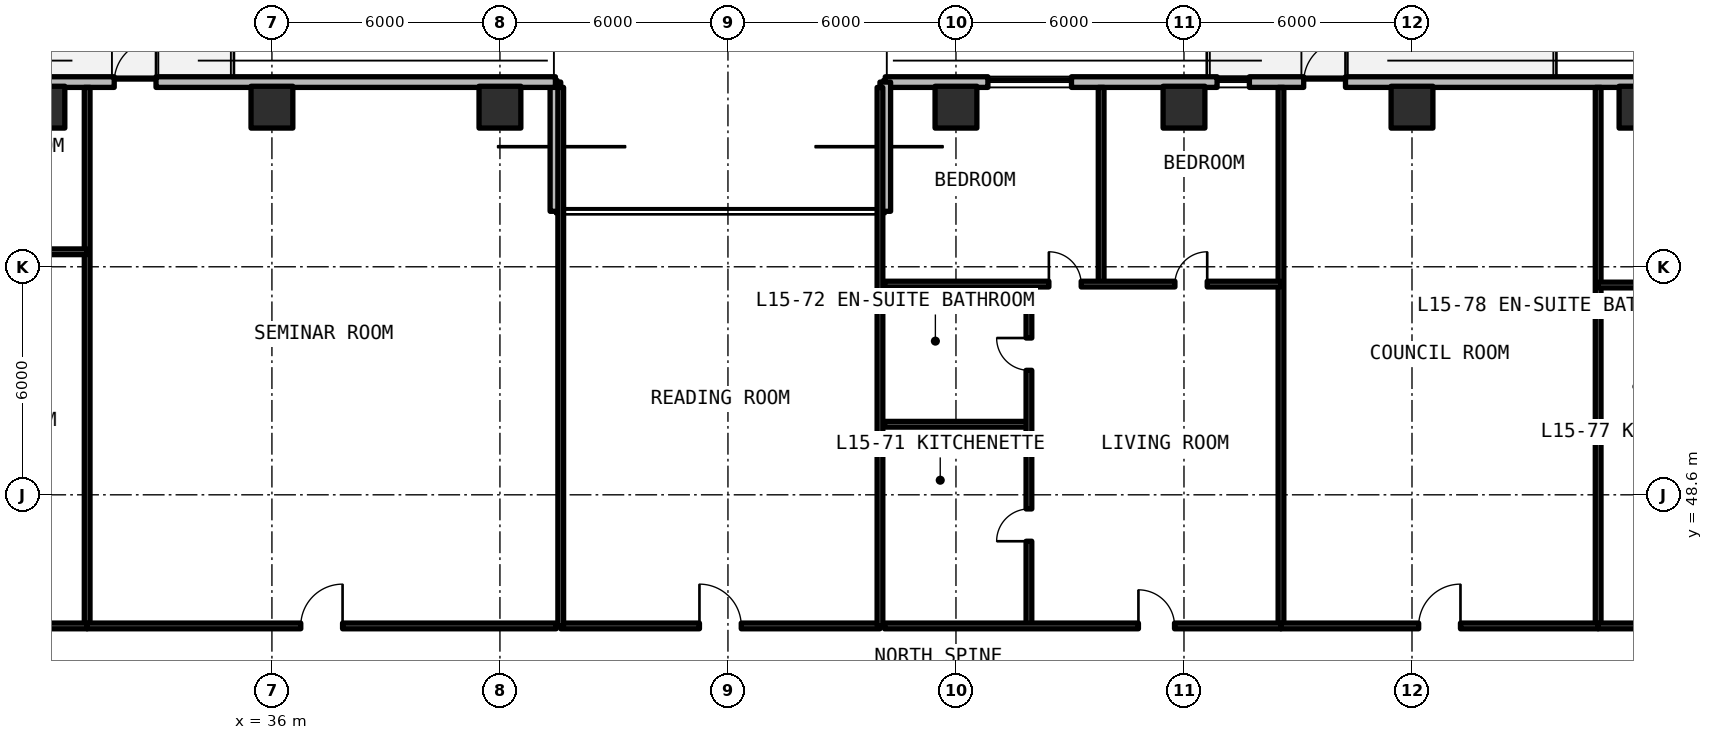
"""IFC4 building model, lengths in metres.
Left out: names, types, materials, properties, quantities, classifications, styles, units other than length and angle.
Written with IfcOpenShell. Run it as: python <this file> out.ifc"""

import sys

from ifc_helpers import new_model, si_unit, direction, frame, frame_2d, origin, origin_2d, place, context, subcontext, project, spatial, rectangle, extrude, element, fill, save


model = new_model("IFC4")
c1 = context("Model", 3, precision=1e-05, world=origin(), true_north=direction((0.0, 1.0)))
c2 = subcontext(c1, "Body", "Model", "MODEL_VIEW")
j1 = project(units=[si_unit("LENGTHUNIT", "METRE"), si_unit("PLANEANGLEUNIT", "RADIAN")], contexts=[c1])
p1 = place(None, origin())
s1 = spatial("IfcSite", under=j1, at=p1, CompositionType="ELEMENT")
p2 = place(p1, origin())
s2 = spatial("IfcBuilding", under=s1, at=p2, CompositionType="ELEMENT")
p3 = place(p2, frame((0.0, 0.0, 55.44)))
s3 = spatial("IfcBuildingStorey", under=s2, at=p3, CompositionType="ELEMENT", Elevation=55.44)
for number, where, z_axis, x_axis in (
    (1, (30.0, 58.8, 0.0), (0.0, 0.0, 1.0), (1.0, 0.0, 0.0)),
    (2, (36.0, 58.8, 0.0), (0.0, 0.0, 1.0), (1.0, 0.0, 0.0)),
    (3, (42.0, 58.8, 0.0), (0.0, 0.0, 1.0), (1.0, 0.0, 0.0)),
    (4, (54.0, 58.8, 0.0), (0.0, 0.0, 1.0), (1.0, 0.0, 0.0)),
    (5, (60.0, 58.8, 0.0), (0.0, 0.0, 1.0), (1.0, 0.0, 0.0)),
    (6, (66.0, 58.8, 0.0), (0.0, 0.0, 1.0), (1.0, 0.0, 0.0)),
    (7, (72.0, 58.8, 0.0), (0.0, 0.0, 1.0), (1.0, 0.0, 0.0)),
):
    element("IfcColumn", number, at=place(p3, frame(where, z_axis=z_axis, x_axis=x_axis)), inside=s3, PredefinedType="COLUMN", context=c2, shape_type="SweptSolid", body=[
        extrude(rectangle(XDim=1.1, YDim=1.1, at=origin_2d()), origin(), (0.0, 0.0, 1.0), 3.3),
    ])
p4 = place(p3, frame((96.542, 59.46, 0.0), z_axis=(0.0, 0.0, 1.0), x_axis=(-1.0, 0.0, 0.0)))
e8 = element("IfcWall", 8, at=p4, inside=s3, PredefinedType="SOLIDWALL", context=c2, shape_type="SweptSolid", body=[
    extrude(rectangle(XDim=44.402, YDim=0.28, at=frame_2d((22.201, 0.0))), origin(), (0.0, 0.0, 1.0), 3.08),
])
p5 = place(p4, frame((32.292, 0.0, 0.0)))
e9 = element("IfcOpeningElement", 9, at=p5, cuts=e8, PredefinedType="OPENING", context=c2, shape_type="SweptSolid", body=[
    extrude(rectangle(XDim=1.1, YDim=2.15, at=frame_2d((0.55, 1.075))), frame((0.0, 0.15, 0.0), z_axis=(0.0, -1.0, 0.0), x_axis=(1.0, 0.0, 0.0)), (0.0, 0.0, 1.0), 0.3),
])
p6 = place(p4, frame((20.692, 0.0, 0.0)))
e10 = element("IfcOpeningElement", 10, at=p6, cuts=e8, PredefinedType="OPENING", context=c2, shape_type="SweptSolid", body=[
    extrude(rectangle(XDim=1.1, YDim=2.15, at=frame_2d((0.55, 1.075))), frame((0.0, 0.15, 0.0), z_axis=(0.0, -1.0, 0.0), x_axis=(1.0, 0.0, 0.0)), (0.0, 0.0, 1.0), 0.3),
])
p7 = place(p4, frame((8.342, 0.0, 0.0)))
e11 = element("IfcOpeningElement", 11, at=p7, cuts=e8, PredefinedType="OPENING", context=c2, shape_type="SweptSolid", body=[
    extrude(rectangle(XDim=1.1, YDim=2.15, at=frame_2d((0.55, 1.075))), frame((0.0, 0.15, 0.0), z_axis=(0.0, -1.0, 0.0), x_axis=(1.0, 0.0, 0.0)), (0.0, 0.0, 1.0), 0.3),
])
p8 = place(p4, frame((39.502, 0.0, 0.78)))
e12 = element("IfcOpeningElement", 12, at=p8, cuts=e8, PredefinedType="OPENING", context=c2, shape_type="SweptSolid", body=[
    extrude(rectangle(XDim=2.2, YDim=1.66, at=frame_2d((1.1, 0.83))), frame((0.0, 0.15, 0.0), z_axis=(0.0, -1.0, 0.0), x_axis=(1.0, 0.0, 0.0)), (0.0, 0.0, 1.0), 0.3),
])
p9 = place(p4, frame((34.821, 0.0, 0.78)))
e13 = element("IfcOpeningElement", 13, at=p9, cuts=e8, PredefinedType="OPENING", context=c2, shape_type="SweptSolid", body=[
    extrude(rectangle(XDim=0.85, YDim=1.65, at=frame_2d((0.425, 0.825))), frame((0.0, 0.15, 0.0), z_axis=(0.0, -1.0, 0.0), x_axis=(1.0, 0.0, 0.0)), (0.0, 0.0, 1.0), 0.3),
])
p10 = place(p4, frame((15.472, 0.0, 0.78)))
e14 = element("IfcOpeningElement", 14, at=p10, cuts=e8, PredefinedType="OPENING", context=c2, shape_type="SweptSolid", body=[
    extrude(rectangle(XDim=2.2, YDim=1.66, at=frame_2d((1.1, 0.83))), frame((0.0, 0.15, 0.0), z_axis=(0.0, -1.0, 0.0), x_axis=(1.0, 0.0, 0.0)), (0.0, 0.0, 1.0), 0.3),
])
p11 = place(p4, frame((2.288, 0.0, 0.78)))
e15 = element("IfcOpeningElement", 15, at=p11, cuts=e8, PredefinedType="OPENING", context=c2, shape_type="SweptSolid", body=[
    extrude(rectangle(XDim=2.2, YDim=1.66, at=frame_2d((1.1, 0.83))), frame((0.0, 0.15, 0.0), z_axis=(0.0, -1.0, 0.0), x_axis=(1.0, 0.0, 0.0)), (0.0, 0.0, 1.0), 0.3),
])
for number, where, z_axis, x_axis in (
    (16, (52.14, 59.46, 0.0), (0.0, 0.0, 1.0), (0.0, -1.0, 0.0)),
    (17, (43.46, 56.06, 0.0), (0.0, 0.0, 1.0), (0.0, 1.0, 0.0)),
):
    element("IfcWall", number, at=place(p3, frame(where, z_axis=z_axis, x_axis=x_axis)), inside=s3, PredefinedType="SOLIDWALL", context=c2, shape_type="SweptSolid", body=[
        extrude(rectangle(XDim=3.4, YDim=0.28, at=frame_2d((1.7, 0.0))), origin(), (0.0, 0.0, 1.0), 3.08),
    ])
p12 = place(p3, frame((43.46, 59.46, 0.0), z_axis=(0.0, 0.0, 1.0), x_axis=(-1.0, 0.0, 0.0)))
e18 = element("IfcWall", 18, at=p12, inside=s3, PredefinedType="SOLIDWALL", context=c2, shape_type="SweptSolid", body=[
    extrude(rectangle(XDim=22.602, YDim=0.28, at=frame_2d((11.301, 0.0))), origin(), (0.0, 0.0, 1.0), 3.08),
])
p13 = place(p12, frame((10.51, 0.0, 0.0)))
e19 = element("IfcOpeningElement", 19, at=p13, cuts=e18, PredefinedType="OPENING", context=c2, shape_type="SweptSolid", body=[
    extrude(rectangle(XDim=1.1, YDim=2.15, at=frame_2d((0.55, 1.075))), frame((0.0, 0.15, 0.0), z_axis=(0.0, -1.0, 0.0), x_axis=(1.0, 0.0, 0.0)), (0.0, 0.0, 1.0), 0.3),
])
p14 = place(p12, frame((16.34, 0.0, 0.78)))
e20 = element("IfcOpeningElement", 20, at=p14, cuts=e18, PredefinedType="OPENING", context=c2, shape_type="SweptSolid", body=[
    extrude(rectangle(XDim=2.2, YDim=1.66, at=frame_2d((1.1, 0.83))), frame((0.0, 0.15, 0.0), z_axis=(0.0, -1.0, 0.0), x_axis=(1.0, 0.0, 0.0)), (0.0, 0.0, 1.0), 0.3),
])
p15 = place(p12, frame((14.206, 0.0, 0.78)))
e21 = element("IfcOpeningElement", 21, at=p15, cuts=e18, PredefinedType="OPENING", context=c2, shape_type="SweptSolid", body=[
    extrude(rectangle(XDim=0.85, YDim=1.65, at=frame_2d((0.425, 0.825))), frame((0.0, 0.15, 0.0), z_axis=(0.0, -1.0, 0.0), x_axis=(1.0, 0.0, 0.0)), (0.0, 0.0, 1.0), 0.3),
])
p16 = place(p3, frame((43.6, 45.15, 0.0), z_axis=(0.0, 0.0, 1.0), x_axis=(1.0, 0.0, 0.0)))
e22 = element("IfcWall", 22, at=p16, inside=s3, PredefinedType="SOLIDWALL", context=c2, shape_type="SweptSolid", body=[
    extrude(rectangle(XDim=8.4, YDim=0.15, at=frame_2d((4.2, 0.0))), origin(), (0.0, 0.0, 1.0), 2.35),
])
p17 = place(p16, frame((3.65, 0.0, 0.0)))
e23 = element("IfcOpeningElement", 23, at=p17, cuts=e22, PredefinedType="OPENING", context=c2, shape_type="SweptSolid", body=[
    extrude(rectangle(XDim=1.1, YDim=2.15, at=frame_2d((0.55, 1.075))), frame((0.0, 0.085, 0.0), z_axis=(0.0, -1.0, 0.0), x_axis=(1.0, 0.0, 0.0)), (0.0, 0.0, 1.0), 0.17),
])
for number, where, z_axis, x_axis in (
    (24, (43.6, 45.15, 0.0), (0.0, 0.0, 1.0), (0.0, 1.0, 0.0)),
    (25, (52.0, 45.15, 0.0), (0.0, 0.0, 1.0), (0.0, 1.0, 0.0)),
    (26, (31.138, 45.15, 0.0), (0.0, 0.0, 1.0), (0.0, 1.0, 0.0)),
):
    element("IfcWall", number, at=place(p3, frame(where, z_axis=z_axis, x_axis=x_axis)), inside=s3, PredefinedType="SOLIDWALL", context=c2, shape_type="SweptSolid", body=[
        extrude(rectangle(XDim=14.17, YDim=0.15, at=frame_2d((7.085, 0.0))), origin(), (0.0, 0.0, 1.0), 2.35),
    ])
p18 = place(p3, frame((21.0, 54.994, 0.0), z_axis=(0.0, 0.0, 1.0), x_axis=(1.0, 0.0, 0.0)))
e27 = element("IfcWall", 27, at=p18, inside=s3, PredefinedType="PARTITIONING", context=c2, shape_type="SweptSolid", body=[
    extrude(rectangle(XDim=10.138, YDim=0.15, at=frame_2d((5.069, 0.0))), origin(), (0.0, 0.0, 1.0), 2.35),
])
p19 = place(p18, frame((5.445, 0.0, 0.0)))
e28 = element("IfcOpeningElement", 28, at=p19, cuts=e27, PredefinedType="OPENING", context=c2, shape_type="SweptSolid", body=[
    extrude(rectangle(XDim=0.85, YDim=2.1, at=frame_2d((0.425, 1.05))), frame((0.0, 0.085, 0.0), z_axis=(0.0, -1.0, 0.0), x_axis=(1.0, 0.0, 0.0)), (0.0, 0.0, 1.0), 0.17),
])
p20 = place(p18, frame((8.054, 0.0, 0.0)))
e29 = element("IfcOpeningElement", 29, at=p20, cuts=e27, PredefinedType="OPENING", context=c2, shape_type="SweptSolid", body=[
    extrude(rectangle(XDim=0.85, YDim=2.1, at=frame_2d((0.425, 1.05))), frame((0.0, 0.085, 0.0), z_axis=(0.0, -1.0, 0.0), x_axis=(1.0, 0.0, 0.0)), (0.0, 0.0, 1.0), 0.17),
])
p21 = place(p3, frame((21.0, 45.15, 0.0), z_axis=(0.0, 0.0, 1.0), x_axis=(1.0, 0.0, 0.0)))
e30 = element("IfcWall", 30, at=p21, inside=s3, PredefinedType="SOLIDWALL", context=c2, shape_type="SweptSolid", body=[
    extrude(rectangle(XDim=10.138, YDim=0.15, at=frame_2d((5.069, 0.0))), origin(), (0.0, 0.0, 1.0), 2.35),
])
p22 = place(p21, frame((7.094, 0.0, 0.0)))
e31 = element("IfcOpeningElement", 31, at=p22, cuts=e30, PredefinedType="OPENING", context=c2, shape_type="SweptSolid", body=[
    extrude(rectangle(XDim=0.95, YDim=2.15, at=frame_2d((0.475, 1.075))), frame((0.0, 0.085, 0.0), z_axis=(0.0, -1.0, 0.0), x_axis=(1.0, 0.0, 0.0)), (0.0, 0.0, 1.0), 0.17),
])
p23 = place(p3, frame((31.138, 45.15, 0.0), z_axis=(0.0, 0.0, 1.0), x_axis=(1.0, 0.0, 0.0)))
e32 = element("IfcWall", 32, at=p23, inside=s3, PredefinedType="SOLIDWALL", context=c2, shape_type="SweptSolid", body=[
    extrude(rectangle(XDim=12.342, YDim=0.15, at=frame_2d((6.171, 0.0))), origin(), (0.0, 0.0, 1.0), 2.35),
])
p24 = place(p23, frame((5.621, 0.0, 0.0)))
e33 = element("IfcOpeningElement", 33, at=p24, cuts=e32, PredefinedType="OPENING", context=c2, shape_type="SweptSolid", body=[
    extrude(rectangle(XDim=1.1, YDim=2.15, at=frame_2d((0.55, 1.075))), frame((0.0, 0.085, 0.0), z_axis=(0.0, -1.0, 0.0), x_axis=(1.0, 0.0, 0.0)), (0.0, 0.0, 1.0), 0.17),
])
p25 = place(p3, frame((62.552, 45.15, 0.0), z_axis=(0.0, 0.0, 1.0), x_axis=(0.0, 1.0, 0.0)))
e34 = element("IfcWall", 34, at=p25, inside=s3, PredefinedType="SOLIDWALL", context=c2, shape_type="SweptSolid", body=[
    extrude(rectangle(XDim=14.17, YDim=0.15, at=frame_2d((7.085, 0.0))), origin(), (0.0, 0.0, 1.0), 2.35),
])
p26 = place(p3, frame((52.12, 50.457, 0.0), z_axis=(0.0, 0.0, 1.0), x_axis=(1.0, 0.0, 0.0)))
e35 = element("IfcWall", 35, at=p26, inside=s3, PredefinedType="PARTITIONING", context=c2, shape_type="SweptSolid", body=[
    extrude(rectangle(XDim=3.8, YDim=0.15, at=frame_2d((1.9, 0.0))), origin(), (0.0, 0.0, 1.0), 2.35),
])
p27 = place(p3, frame((55.92, 45.15, 0.0), z_axis=(0.0, 0.0, 1.0), x_axis=(0.0, 1.0, 0.0)))
e36 = element("IfcWall", 36, at=p27, inside=s3, PredefinedType="PARTITIONING", context=c2, shape_type="SweptSolid", body=[
    extrude(rectangle(XDim=8.995, YDim=0.15, at=frame_2d((4.497, 0.0))), origin(), (0.0, 0.0, 1.0), 2.35),
])
p28 = place(p27, frame((2.229, 0.0, 0.0)))
e37 = element("IfcOpeningElement", 37, at=p28, cuts=e36, PredefinedType="OPENING", context=c2, shape_type="SweptSolid", body=[
    extrude(rectangle(XDim=0.85, YDim=2.1, at=frame_2d((0.425, 1.05))), frame((0.0, 0.085, 0.0), z_axis=(0.0, -1.0, 0.0), x_axis=(1.0, 0.0, 0.0)), (0.0, 0.0, 1.0), 0.17),
])
p29 = place(p27, frame((6.726, 0.0, 0.0)))
e38 = element("IfcOpeningElement", 38, at=p29, cuts=e36, PredefinedType="OPENING", context=c2, shape_type="SweptSolid", body=[
    extrude(rectangle(XDim=0.85, YDim=2.1, at=frame_2d((0.425, 1.05))), frame((0.0, 0.085, 0.0), z_axis=(0.0, -1.0, 0.0), x_axis=(1.0, 0.0, 0.0)), (0.0, 0.0, 1.0), 0.17),
])
p30 = place(p3, frame((57.82, 54.145, 0.0), z_axis=(0.0, 0.0, 1.0), x_axis=(0.0, 1.0, 0.0)))
e39 = element("IfcWall", 39, at=p30, inside=s3, PredefinedType="PARTITIONING", context=c2, shape_type="SweptSolid", body=[
    extrude(rectangle(XDim=5.176, YDim=0.15, at=frame_2d((2.588, 0.0))), origin(), (0.0, 0.0, 1.0), 2.35),
])
p31 = place(p3, frame((52.12, 54.145, 0.0), z_axis=(0.0, 0.0, 1.0), x_axis=(1.0, 0.0, 0.0)))
e40 = element("IfcWall", 40, at=p31, inside=s3, PredefinedType="PARTITIONING", context=c2, shape_type="SweptSolid", body=[
    extrude(rectangle(XDim=10.432, YDim=0.15, at=frame_2d((5.216, 0.0))), origin(), (0.0, 0.0, 1.0), 2.35),
])
p32 = place(p31, frame((4.325, 0.0, 0.0)))
e41 = element("IfcOpeningElement", 41, at=p32, cuts=e40, PredefinedType="OPENING", context=c2, shape_type="SweptSolid", body=[
    extrude(rectangle(XDim=0.85, YDim=2.1, at=frame_2d((0.425, 1.05))), frame((0.0, 0.085, 0.0), z_axis=(0.0, -1.0, 0.0), x_axis=(1.0, 0.0, 0.0)), (0.0, 0.0, 1.0), 0.17),
])
p33 = place(p31, frame((7.641, 0.0, 0.0)))
e42 = element("IfcOpeningElement", 42, at=p33, cuts=e40, PredefinedType="OPENING", context=c2, shape_type="SweptSolid", body=[
    extrude(rectangle(XDim=0.85, YDim=2.1, at=frame_2d((0.425, 1.05))), frame((0.0, 0.085, 0.0), z_axis=(0.0, -1.0, 0.0), x_axis=(1.0, 0.0, 0.0)), (0.0, 0.0, 1.0), 0.17),
])
p34 = place(p3, frame((52.12, 45.15, 0.0), z_axis=(0.0, 0.0, 1.0), x_axis=(1.0, 0.0, 0.0)))
e43 = element("IfcWall", 43, at=p34, inside=s3, PredefinedType="SOLIDWALL", context=c2, shape_type="SweptSolid", body=[
    extrude(rectangle(XDim=10.432, YDim=0.15, at=frame_2d((5.216, 0.0))), origin(), (0.0, 0.0, 1.0), 2.35),
])
p35 = place(p34, frame((6.681, 0.0, 0.0)))
e44 = element("IfcOpeningElement", 44, at=p35, cuts=e43, PredefinedType="OPENING", context=c2, shape_type="SweptSolid", body=[
    extrude(rectangle(XDim=0.95, YDim=2.15, at=frame_2d((0.475, 1.075))), frame((0.0, 0.085, 0.0), z_axis=(0.0, -1.0, 0.0), x_axis=(1.0, 0.0, 0.0)), (0.0, 0.0, 1.0), 0.17),
])
p36 = place(p3, frame((70.898, 45.15, 0.0), z_axis=(0.0, 0.0, 1.0), x_axis=(0.0, 1.0, 0.0)))
e45 = element("IfcWall", 45, at=p36, inside=s3, PredefinedType="SOLIDWALL", context=c2, shape_type="SweptSolid", body=[
    extrude(rectangle(XDim=14.17, YDim=0.15, at=frame_2d((7.085, 0.0))), origin(), (0.0, 0.0, 1.0), 2.35),
])
p37 = place(p3, frame((62.552, 45.15, 0.0), z_axis=(0.0, 0.0, 1.0), x_axis=(1.0, 0.0, 0.0)))
e46 = element("IfcWall", 46, at=p37, inside=s3, PredefinedType="SOLIDWALL", context=c2, shape_type="SweptSolid", body=[
    extrude(rectangle(XDim=8.346, YDim=0.15, at=frame_2d((4.173, 0.0))), origin(), (0.0, 0.0, 1.0), 2.35),
])
p38 = place(p37, frame((3.623, 0.0, 0.0)))
e47 = element("IfcOpeningElement", 47, at=p38, cuts=e46, PredefinedType="OPENING", context=c2, shape_type="SweptSolid", body=[
    extrude(rectangle(XDim=1.1, YDim=2.15, at=frame_2d((0.55, 1.075))), frame((0.0, 0.085, 0.0), z_axis=(0.0, -1.0, 0.0), x_axis=(1.0, 0.0, 0.0)), (0.0, 0.0, 1.0), 0.17),
])
p39 = place(p3, frame((70.898, 50.442, 0.0), z_axis=(0.0, 0.0, 1.0), x_axis=(1.0, 0.0, 0.0)))
e48 = element("IfcWall", 48, at=p39, inside=s3, PredefinedType="PARTITIONING", context=c2, shape_type="SweptSolid", body=[
    extrude(rectangle(XDim=3.021, YDim=0.15, at=frame_2d((1.511, 0.0))), origin(), (0.0, 0.0, 1.0), 2.35),
])
p40 = place(p3, frame((70.898, 54.12, 0.0), z_axis=(0.0, 0.0, 1.0), x_axis=(1.0, 0.0, 0.0)))
e49 = element("IfcWall", 49, at=p40, inside=s3, PredefinedType="PARTITIONING", context=c2, shape_type="SweptSolid", body=[
    extrude(rectangle(XDim=10.896, YDim=0.15, at=frame_2d((5.448, 0.0))), origin(), (0.0, 0.0, 1.0), 2.35),
])
p41 = place(p40, frame((3.919, 0.0, 0.0)))
e50 = element("IfcOpeningElement", 50, at=p41, cuts=e49, PredefinedType="OPENING", context=c2, shape_type="SweptSolid", body=[
    extrude(rectangle(XDim=0.85, YDim=2.1, at=frame_2d((0.425, 1.05))), frame((0.0, 0.085, 0.0), z_axis=(0.0, -1.0, 0.0), x_axis=(1.0, 0.0, 0.0)), (0.0, 0.0, 1.0), 0.17),
])
p42 = place(p40, frame((7.856, 0.0, 0.0)))
e51 = element("IfcOpeningElement", 51, at=p42, cuts=e49, PredefinedType="OPENING", context=c2, shape_type="SweptSolid", body=[
    extrude(rectangle(XDim=0.85, YDim=2.1, at=frame_2d((0.425, 1.05))), frame((0.0, 0.085, 0.0), z_axis=(0.0, -1.0, 0.0), x_axis=(1.0, 0.0, 0.0)), (0.0, 0.0, 1.0), 0.17),
])
p43 = place(p3, frame((70.898, 45.15, 0.0), z_axis=(0.0, 0.0, 1.0), x_axis=(1.0, 0.0, 0.0)))
e52 = element("IfcWall", 52, at=p43, inside=s3, PredefinedType="SOLIDWALL", context=c2, shape_type="SweptSolid", body=[
    extrude(rectangle(XDim=10.896, YDim=0.15, at=frame_2d((5.448, 0.0))), origin(), (0.0, 0.0, 1.0), 2.35),
])
p44 = place(p43, frame((6.524, 0.0, 0.0)))
e53 = element("IfcOpeningElement", 53, at=p44, cuts=e52, PredefinedType="OPENING", context=c2, shape_type="SweptSolid", body=[
    extrude(rectangle(XDim=0.95, YDim=2.15, at=frame_2d((0.475, 1.075))), frame((0.0, 0.085, 0.0), z_axis=(0.0, -1.0, 0.0), x_axis=(1.0, 0.0, 0.0)), (0.0, 0.0, 1.0), 0.17),
])
p45 = place(p5, frame((1.1, 0.0, 0.0), z_axis=(0.0, 0.0, 1.0), x_axis=(-1.0, 0.0, 0.0)))
e54 = element("IfcDoor", 54, at=p45, inside=s3, OperationType="SINGLE_SWING_RIGHT", PredefinedType="DOOR", context=c2, shape_type="SweptSolid", body=[
    extrude(rectangle(XDim=1.1, YDim=2.15, at=frame_2d((0.55, 1.075))), frame((0.0, 0.025, 0.0), z_axis=(0.0, -1.0, 0.0), x_axis=(1.0, 0.0, 0.0)), (0.0, 0.0, 1.0), 0.05),
])
fill(e9, e54)
p46 = place(p8, origin())
e55 = element("IfcWindow", 55, at=p46, inside=s3, PartitioningType="SINGLE_PANEL", PredefinedType="WINDOW", context=c2, shape_type="SweptSolid", body=[
    extrude(rectangle(XDim=2.2, YDim=1.66, at=frame_2d((1.1, 0.83))), frame((0.0, 0.03, 0.0), z_axis=(0.0, -1.0, 0.0), x_axis=(1.0, 0.0, 0.0)), (0.0, 0.0, 1.0), 0.06),
])
fill(e12, e55)
p47 = place(p9, origin())
e56 = element("IfcWindow", 56, at=p47, inside=s3, PartitioningType="SINGLE_PANEL", PredefinedType="WINDOW", context=c2, shape_type="SweptSolid", body=[
    extrude(rectangle(XDim=0.85, YDim=1.65, at=frame_2d((0.425, 0.825))), frame((0.0, 0.03, 0.0), z_axis=(0.0, -1.0, 0.0), x_axis=(1.0, 0.0, 0.0)), (0.0, 0.0, 1.0), 0.06),
])
fill(e13, e56)
p48 = place(p13, frame((1.1, 0.0, 0.0), z_axis=(0.0, 0.0, 1.0), x_axis=(-1.0, 0.0, 0.0)))
e57 = element("IfcDoor", 57, at=p48, inside=s3, OperationType="SINGLE_SWING_LEFT", PredefinedType="DOOR", context=c2, shape_type="SweptSolid", body=[
    extrude(rectangle(XDim=1.1, YDim=2.15, at=frame_2d((0.55, 1.075))), frame((0.0, 0.025, 0.0), z_axis=(0.0, -1.0, 0.0), x_axis=(1.0, 0.0, 0.0)), (0.0, 0.0, 1.0), 0.05),
])
fill(e19, e57)
p49 = place(p17, origin())
e58 = element("IfcDoor", 58, at=p49, inside=s3, OperationType="SINGLE_SWING_LEFT", PredefinedType="DOOR", context=c2, shape_type="SweptSolid", body=[
    extrude(rectangle(XDim=1.1, YDim=2.15, at=frame_2d((0.55, 1.075))), frame((0.0, 0.025, 0.0), z_axis=(0.0, -1.0, 0.0), x_axis=(1.0, 0.0, 0.0)), (0.0, 0.0, 1.0), 0.05),
])
fill(e23, e58)
p50 = place(p24, origin())
e59 = element("IfcDoor", 59, at=p50, inside=s3, OperationType="SINGLE_SWING_RIGHT", PredefinedType="DOOR", context=c2, shape_type="SweptSolid", body=[
    extrude(rectangle(XDim=1.1, YDim=2.15, at=frame_2d((0.55, 1.075))), frame((0.0, 0.025, 0.0), z_axis=(0.0, -1.0, 0.0), x_axis=(1.0, 0.0, 0.0)), (0.0, 0.0, 1.0), 0.05),
])
fill(e33, e59)
p51 = place(p28, origin())
e60 = element("IfcDoor", 60, at=p51, inside=s3, OperationType="SINGLE_SWING_LEFT", PredefinedType="DOOR", context=c2, shape_type="SweptSolid", body=[
    extrude(rectangle(XDim=0.85, YDim=2.1, at=frame_2d((0.425, 1.05))), frame((0.0, 0.025, 0.0), z_axis=(0.0, -1.0, 0.0), x_axis=(1.0, 0.0, 0.0)), (0.0, 0.0, 1.0), 0.05),
])
fill(e37, e60)
p52 = place(p29, origin())
e61 = element("IfcDoor", 61, at=p52, inside=s3, OperationType="SINGLE_SWING_RIGHT", PredefinedType="DOOR", context=c2, shape_type="SweptSolid", body=[
    extrude(rectangle(XDim=0.85, YDim=2.1, at=frame_2d((0.425, 1.05))), frame((0.0, 0.025, 0.0), z_axis=(0.0, -1.0, 0.0), x_axis=(1.0, 0.0, 0.0)), (0.0, 0.0, 1.0), 0.05),
])
fill(e38, e61)
p53 = place(p32, origin())
e62 = element("IfcDoor", 62, at=p53, inside=s3, OperationType="SINGLE_SWING_LEFT", PredefinedType="DOOR", context=c2, shape_type="SweptSolid", body=[
    extrude(rectangle(XDim=0.85, YDim=2.1, at=frame_2d((0.425, 1.05))), frame((0.0, 0.025, 0.0), z_axis=(0.0, -1.0, 0.0), x_axis=(1.0, 0.0, 0.0)), (0.0, 0.0, 1.0), 0.05),
])
fill(e41, e62)
p54 = place(p33, origin())
e63 = element("IfcDoor", 63, at=p54, inside=s3, OperationType="SINGLE_SWING_RIGHT", PredefinedType="DOOR", context=c2, shape_type="SweptSolid", body=[
    extrude(rectangle(XDim=0.85, YDim=2.1, at=frame_2d((0.425, 1.05))), frame((0.0, 0.025, 0.0), z_axis=(0.0, -1.0, 0.0), x_axis=(1.0, 0.0, 0.0)), (0.0, 0.0, 1.0), 0.05),
])
fill(e42, e63)
p55 = place(p35, origin())
e64 = element("IfcDoor", 64, at=p55, inside=s3, OperationType="SINGLE_SWING_LEFT", PredefinedType="DOOR", context=c2, shape_type="SweptSolid", body=[
    extrude(rectangle(XDim=0.95, YDim=2.15, at=frame_2d((0.475, 1.075))), frame((0.0, 0.025, 0.0), z_axis=(0.0, -1.0, 0.0), x_axis=(1.0, 0.0, 0.0)), (0.0, 0.0, 1.0), 0.05),
])
fill(e44, e64)
p56 = place(p38, origin())
e65 = element("IfcDoor", 65, at=p56, inside=s3, OperationType="SINGLE_SWING_RIGHT", PredefinedType="DOOR", context=c2, shape_type="SweptSolid", body=[
    extrude(rectangle(XDim=1.1, YDim=2.15, at=frame_2d((0.55, 1.075))), frame((0.0, 0.025, 0.0), z_axis=(0.0, -1.0, 0.0), x_axis=(1.0, 0.0, 0.0)), (0.0, 0.0, 1.0), 0.05),
])
fill(e47, e65)
save(model, sys.argv[1])
